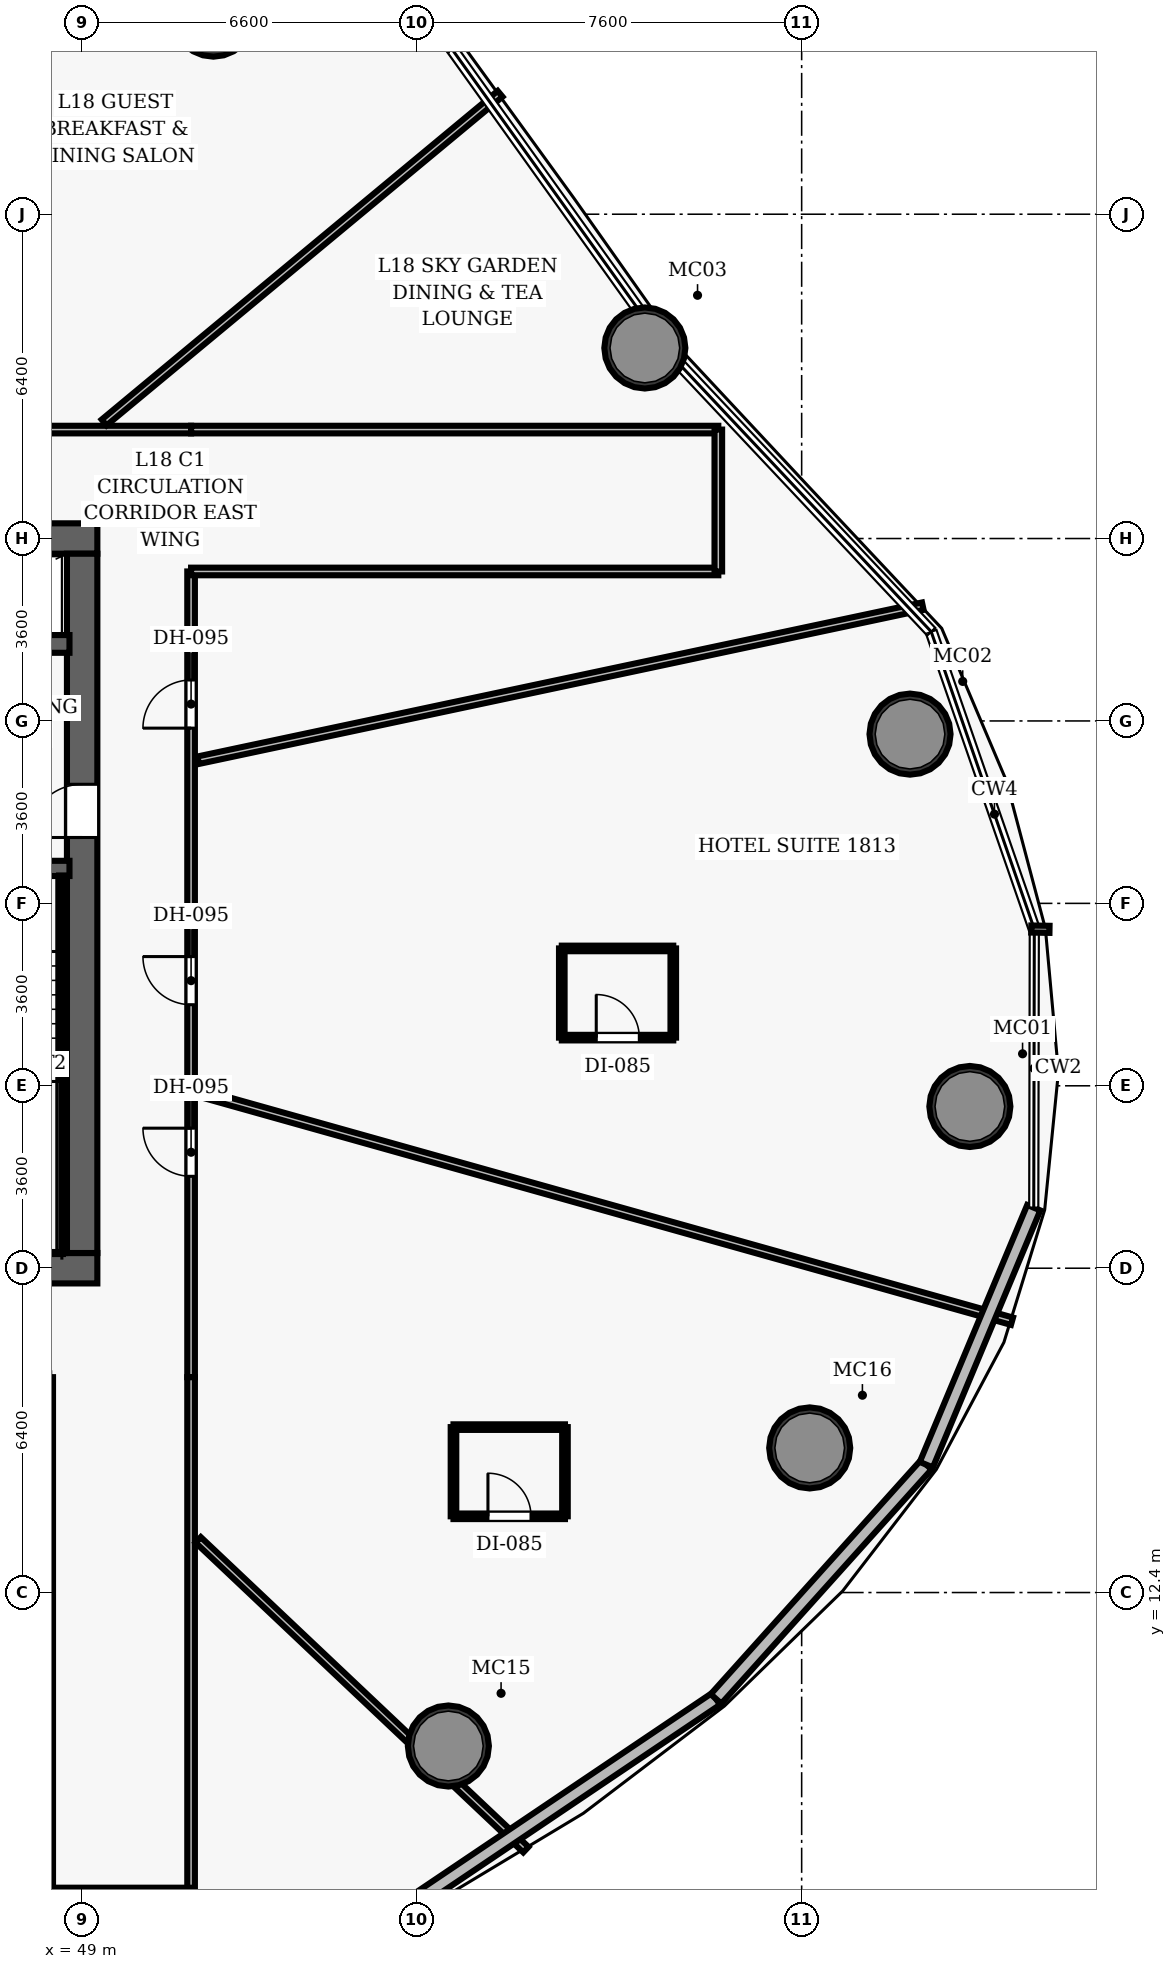
"""IFC4 building model, lengths in metres.
Left out: names, types, materials, properties, quantities, classifications, styles, units other than length and angle.
Written with IfcOpenShell. Run it as: python <this file> out.ifc"""

import sys

from ifc_helpers import new_model, si_unit, direction, frame, frame_2d, origin, origin_2d, place, context, subcontext, project, spatial, rectangle, hollow_circle, extrude, element, fill, save


model = new_model("IFC4")
c1 = context("Model", 3, precision=1e-05, world=origin(), true_north=direction((0.0, 1.0)))
c2 = subcontext(c1, "Body", "Model", "MODEL_VIEW")
j1 = project(units=[si_unit("LENGTHUNIT", "METRE"), si_unit("PLANEANGLEUNIT", "RADIAN")], contexts=[c1])
p1 = place(None, origin())
s1 = spatial("IfcSite", under=j1, at=p1, CompositionType="ELEMENT")
p2 = place(p1, origin())
s2 = spatial("IfcBuilding", under=s1, at=p2, CompositionType="ELEMENT")
p3 = place(p2, frame((0.0, 0.0, 79.9)))
s3 = spatial("IfcBuildingStorey", under=s2, at=p3, CompositionType="ELEMENT", Elevation=79.9)
p4 = place(p3, frame((26.7, 18.8, 0.0), z_axis=(0.0, 0.0, 1.0), x_axis=(1.0, 0.0, 0.0)))
e1 = element("IfcWall", 1, at=p4, inside=s3, PredefinedType="SHEAR", context=c2, shape_type="SweptSolid", body=[
    extrude(rectangle(XDim=22.6, YDim=0.6, at=frame_2d((11.3, 0.0))), origin(), (0.0, 0.0, 1.0), 3.5),
])
p5 = place(p4, frame((14.52, 0.0, 0.0)))
e2 = element("IfcOpeningElement", 2, at=p5, cuts=e1, PredefinedType="OPENING", context=c2, shape_type="SweptSolid", body=[
    extrude(rectangle(XDim=1.05, YDim=2.15, at=frame_2d((0.525, 1.075))), frame((0.0, 0.31, 0.0), z_axis=(0.0, -1.0, 0.0), x_axis=(1.0, 0.0, 0.0)), (0.0, 0.0, 1.0), 0.62),
])
p6 = place(p3, frame((26.7, 33.2, 0.0), z_axis=(0.0, 0.0, 1.0), x_axis=(1.0, 0.0, 0.0)))
e3 = element("IfcWall", 3, at=p6, inside=s3, PredefinedType="SHEAR", context=c2, shape_type="SweptSolid", body=[
    extrude(rectangle(XDim=22.6, YDim=0.6, at=frame_2d((11.3, 0.0))), origin(), (0.0, 0.0, 1.0), 3.5),
])
p7 = place(p6, frame((4.62, 0.0, 0.0)))
e4 = element("IfcOpeningElement", 4, at=p7, cuts=e3, PredefinedType="OPENING", context=c2, shape_type="SweptSolid", body=[
    extrude(rectangle(XDim=1.05, YDim=2.15, at=frame_2d((0.525, 1.075))), frame((0.0, 0.31, 0.0), z_axis=(0.0, -1.0, 0.0), x_axis=(1.0, 0.0, 0.0)), (0.0, 0.0, 1.0), 0.62),
])
p8 = place(p6, frame((14.52, 0.0, 0.0)))
e5 = element("IfcOpeningElement", 5, at=p8, cuts=e3, PredefinedType="OPENING", context=c2, shape_type="SweptSolid", body=[
    extrude(rectangle(XDim=1.05, YDim=2.15, at=frame_2d((0.525, 1.075))), frame((0.0, 0.31, 0.0), z_axis=(0.0, -1.0, 0.0), x_axis=(1.0, 0.0, 0.0)), (0.0, 0.0, 1.0), 0.62),
])
p9 = place(p3, frame((49.0, 19.1, 0.0), z_axis=(0.0, 0.0, 1.0), x_axis=(0.0, 1.0, 0.0)))
e6 = element("IfcWall", 6, at=p9, inside=s3, PredefinedType="SHEAR", context=c2, shape_type="SweptSolid", body=[
    extrude(rectangle(XDim=13.8, YDim=0.6, at=frame_2d((6.9, 0.0))), origin(), (0.0, 0.0, 1.0), 3.5),
])
p10 = place(p9, frame((8.2, 0.0, 0.0)))
e7 = element("IfcOpeningElement", 7, at=p10, cuts=e6, PredefinedType="OPENING", context=c2, shape_type="SweptSolid", body=[
    extrude(rectangle(XDim=1.05, YDim=2.15, at=frame_2d((0.525, 1.075))), frame((0.0, 0.31, 0.0), z_axis=(0.0, -1.0, 0.0), x_axis=(1.0, 0.0, 0.0)), (0.0, 0.0, 1.0), 0.62),
])
for number, where, z_axis, x_axis in (
    (8, (66.52, 21.992, 0.0), (0.0, 0.0, 1.0), (1.0, 0.0, 0.0)),
    (9, (65.339, 29.34, 0.0), (0.0, 0.0, 1.0), (1.0, 0.0, 0.0)),
    (10, (60.105, 36.96, 0.0), (0.0, 0.0, 1.0), (1.0, 0.0, 0.0)),
    (11, (51.59, 43.509, 0.0), (0.0, 0.0, 1.0), (1.0, 0.0, 0.0)),
    (12, (56.228, 9.371, 0.0), (0.0, 0.0, 1.0), (1.0, 0.0, 0.0)),
    (13, (63.359, 15.254, 0.0), (0.0, 0.0, 1.0), (1.0, 0.0, 0.0)),
):
    element("IfcColumn", number, at=place(p3, frame(where, z_axis=z_axis, x_axis=x_axis)), inside=s3, PredefinedType="COLUMN", context=c2, shape_type="SweptSolid", body=[
        extrude(hollow_circle(Radius=0.8, WallThickness=0.06, at=origin_2d()), origin(), (0.0, 0.0, 1.0), 3.5),
    ])
p11 = place(p3, frame((45.08, 26.69, 0.0), z_axis=(0.0, 0.0, 1.0), x_axis=(1.0, 0.0, 0.0)))
e14 = element("IfcWall", 14, at=p11, inside=s3, PredefinedType="SHEAR", context=c2, shape_type="SweptSolid", body=[
    extrude(rectangle(XDim=3.67, YDim=0.3, at=frame_2d((1.835, 0.0))), origin(), (0.0, 0.0, 1.0), 3.5),
])
p12 = place(p11, frame((1.05, 0.0, 0.0)))
e15 = element("IfcOpeningElement", 15, at=p12, cuts=e14, PredefinedType="OPENING", context=c2, shape_type="SweptSolid", body=[
    extrude(rectangle(XDim=1.1, YDim=2.15, at=frame_2d((0.55, 1.075))), frame((0.0, 0.16, 0.0), z_axis=(0.0, -1.0, 0.0), x_axis=(1.0, 0.0, 0.0)), (0.0, 0.0, 1.0), 0.32),
])
p13 = place(p3, frame((48.605, 19.1, 0.0), z_axis=(0.0, 0.0, 1.0), x_axis=(0.0, 1.0, 0.0)))
e16 = element("IfcWall", 16, at=p13, inside=s3, PredefinedType="SHEAR", context=c2, shape_type="SweptSolid", body=[
    extrude(rectangle(XDim=7.45, YDim=0.12, at=frame_2d((3.725, 0.0))), origin(), (0.0, 0.0, 1.0), 3.5),
])
p14 = place(p3, frame((45.51, 19.16, 0.0), z_axis=(0.0, 0.0, 1.0), x_axis=(1.0, 0.0, 0.0)))
e17 = element("IfcWall", 17, at=p14, inside=s3, PredefinedType="SHEAR", context=c2, shape_type="SweptSolid", body=[
    extrude(rectangle(XDim=3.095, YDim=0.12, at=frame_2d((1.547, 0.0))), origin(), (0.0, 0.0, 1.0), 3.5),
])
p15 = place(p3, frame((45.08, 31.12, 0.0), z_axis=(0.0, 0.0, 1.0), x_axis=(1.0, 0.0, 0.0)))
e18 = element("IfcWall", 18, at=p15, inside=s3, PredefinedType="SHEAR", context=c2, shape_type="SweptSolid", body=[
    extrude(rectangle(XDim=3.67, YDim=0.35, at=frame_2d((1.835, 0.0))), origin(), (0.0, 0.0, 1.0), 2.6),
])
p16 = place(p15, frame((1.25, 0.0, 0.0)))
e19 = element("IfcOpeningElement", 19, at=p16, cuts=e18, PredefinedType="OPENING", context=c2, shape_type="SweptSolid", body=[
    extrude(rectangle(XDim=1.1, YDim=2.15, at=frame_2d((0.55, 1.075))), frame((0.0, 0.185, 0.0), z_axis=(0.0, -1.0, 0.0), x_axis=(1.0, 0.0, 0.0)), (0.0, 0.0, 1.0), 0.37),
])
p17 = place(p3, frame((27.65, 35.35, 0.0), z_axis=(0.0, 0.0, 1.0), x_axis=(1.0, 0.0, 0.0)))
e20 = element("IfcWall", 20, at=p17, inside=s3, PredefinedType="PARTITIONING", context=c2, shape_type="SweptSolid", body=[
    extrude(rectangle(XDim=23.5, YDim=0.15, at=frame_2d((11.75, 0.0))), origin(), (0.0, 0.0, 1.0), 2.6),
])
p18 = place(p17, frame((15.553, 0.0, 0.0)))
e21 = element("IfcOpeningElement", 21, at=p18, cuts=e20, PredefinedType="OPENING", context=c2, shape_type="SweptSolid", body=[
    extrude(rectangle(XDim=0.95, YDim=2.15, at=frame_2d((0.475, 1.075))), frame((0.0, 0.085, 0.0), z_axis=(0.0, -1.0, 0.0), x_axis=(1.0, 0.0, 0.0)), (0.0, 0.0, 1.0), 0.17),
])
p19 = place(p17, frame((10.082, 0.0, 0.0)))
e22 = element("IfcOpeningElement", 22, at=p19, cuts=e20, PredefinedType="OPENING", context=c2, shape_type="SweptSolid", body=[
    extrude(rectangle(XDim=0.95, YDim=2.15, at=frame_2d((0.475, 1.075))), frame((0.0, 0.085, 0.0), z_axis=(0.0, -1.0, 0.0), x_axis=(1.0, 0.0, 0.0)), (0.0, 0.0, 1.0), 0.17),
])
p20 = place(p17, frame((7.866, 0.0, 0.0)))
e23 = element("IfcOpeningElement", 23, at=p20, cuts=e20, PredefinedType="OPENING", context=c2, shape_type="SweptSolid", body=[
    extrude(rectangle(XDim=0.95, YDim=2.15, at=frame_2d((0.475, 1.075))), frame((0.0, 0.085, 0.0), z_axis=(0.0, -1.0, 0.0), x_axis=(1.0, 0.0, 0.0)), (0.0, 0.0, 1.0), 0.17),
])
p21 = place(p3, frame((51.15, 16.65, 0.0), z_axis=(0.0, 0.0, 1.0), x_axis=(0.0, 1.0, 0.0)))
e24 = element("IfcWall", 24, at=p21, inside=s3, PredefinedType="PARTITIONING", context=c2, shape_type="SweptSolid", body=[
    extrude(rectangle(XDim=15.9, YDim=0.15, at=frame_2d((7.95, 0.0))), origin(), (0.0, 0.0, 1.0), 2.6),
])
p22 = place(p21, frame((12.808, 0.0, 0.0)))
e25 = element("IfcOpeningElement", 25, at=p22, cuts=e24, PredefinedType="OPENING", context=c2, shape_type="SweptSolid", body=[
    extrude(rectangle(XDim=0.95, YDim=2.15, at=frame_2d((0.475, 1.075))), frame((0.0, 0.085, 0.0), z_axis=(0.0, -1.0, 0.0), x_axis=(1.0, 0.0, 0.0)), (0.0, 0.0, 1.0), 0.17),
])
p23 = place(p21, frame((3.964, 0.0, 0.0)))
e26 = element("IfcOpeningElement", 26, at=p23, cuts=e24, PredefinedType="OPENING", context=c2, shape_type="SweptSolid", body=[
    extrude(rectangle(XDim=0.95, YDim=2.15, at=frame_2d((0.475, 1.075))), frame((0.0, 0.085, 0.0), z_axis=(0.0, -1.0, 0.0), x_axis=(1.0, 0.0, 0.0)), (0.0, 0.0, 1.0), 0.17),
])
p24 = place(p21, frame((7.35, 0.0, 0.0)))
e27 = element("IfcOpeningElement", 27, at=p24, cuts=e24, PredefinedType="OPENING", context=c2, shape_type="SweptSolid", body=[
    extrude(rectangle(XDim=0.95, YDim=2.15, at=frame_2d((0.475, 1.075))), frame((0.0, 0.085, 0.0), z_axis=(0.0, -1.0, 0.0), x_axis=(1.0, 0.0, 0.0)), (0.0, 0.0, 1.0), 0.17),
])
for number, where, z_axis, x_axis in (
    (28, (51.15, 35.35, 0.0), (0.0, 0.0, 1.0), (1.0, 0.0, 0.0)),
    (29, (51.15, 32.55, 0.0), (0.0, 0.0, 1.0), (1.0, 0.0, 0.0)),
):
    element("IfcWall", number, at=place(p3, frame(where, z_axis=z_axis, x_axis=x_axis)), inside=s3, PredefinedType="PARTITIONING", context=c2, shape_type="SweptSolid", body=[
        extrude(rectangle(XDim=10.405, YDim=0.15, at=frame_2d((5.203, 0.0))), origin(), (0.0, 0.0, 1.0), 2.6),
    ])
p25 = place(p3, frame((61.555, 32.55, 0.0), z_axis=(0.0, 0.0, 1.0), x_axis=(0.0, 1.0, 0.0)))
e30 = element("IfcWall", 30, at=p25, inside=s3, PredefinedType="PARTITIONING", context=c2, shape_type="SweptSolid", body=[
    extrude(rectangle(XDim=2.8, YDim=0.15, at=frame_2d((1.4, 0.0))), origin(), (0.0, 0.0, 1.0), 2.6),
])
for number, where, z_axis, x_axis in (
    (31, (48.35, 6.5, 0.0), (0.0, 0.0, 1.0), (0.0, 1.0, 0.0)),
    (32, (51.15, 6.5, 0.0), (0.0, 0.0, 1.0), (0.0, 1.0, 0.0)),
):
    element("IfcWall", number, at=place(p3, frame(where, z_axis=z_axis, x_axis=x_axis)), inside=s3, PredefinedType="PARTITIONING", context=c2, shape_type="SweptSolid", body=[
        extrude(rectangle(XDim=10.15, YDim=0.15, at=frame_2d((5.075, 0.0))), origin(), (0.0, 0.0, 1.0), 2.6),
    ])
p26 = place(p3, frame((48.35, 6.5, 0.0), z_axis=(0.0, 0.0, 1.0), x_axis=(1.0, 0.0, 0.0)))
e33 = element("IfcWall", 33, at=p26, inside=s3, PredefinedType="PARTITIONING", context=c2, shape_type="SweptSolid", body=[
    extrude(rectangle(XDim=2.8, YDim=0.15, at=frame_2d((1.4, 0.0))), origin(), (0.0, 0.0, 1.0), 2.6),
])
p27 = place(p3, frame((51.29, 28.825, 0.0), z_axis=(0.0, 0.0, 1.0), x_axis=(0.978150744302, 0.207896900943, 0.0)))
e34 = element("IfcWall", 34, at=p27, inside=s3, PredefinedType="PARTITIONING", context=c2, shape_type="SweptSolid", body=[
    extrude(rectangle(XDim=14.62, YDim=0.15, at=frame_2d((7.31, 0.0))), origin(), (0.0, 0.0, 1.0), 2.6),
])
p28 = place(p3, frame((49.434, 35.49, 0.0), z_axis=(0.0, 0.0, 1.0), x_axis=(0.769488794151, 0.638660313216, 0.0)))
e35 = element("IfcWall", 35, at=p28, inside=s3, PredefinedType="PARTITIONING", context=c2, shape_type="SweptSolid", body=[
    extrude(rectangle(XDim=10.155, YDim=0.15, at=frame_2d((5.078, 0.0))), origin(), (0.0, 0.0, 1.0), 2.6),
])
p29 = place(p3, frame((51.29, 13.439, 0.0), z_axis=(0.0, 0.0, 1.0), x_axis=(0.72675745836, -0.686894167043, 0.0)))
e36 = element("IfcWall", 36, at=p29, inside=s3, PredefinedType="PARTITIONING", context=c2, shape_type="SweptSolid", body=[
    extrude(rectangle(XDim=8.899, YDim=0.15, at=frame_2d((4.449, 0.0))), origin(), (0.0, 0.0, 1.0), 2.6),
])
p30 = place(p3, frame((51.29, 22.266, 0.0), z_axis=(0.0, 0.0, 1.0), x_axis=(0.962725636105, -0.270479850611, 0.0)))
e37 = element("IfcWall", 37, at=p30, inside=s3, PredefinedType="PARTITIONING", context=c2, shape_type="SweptSolid", body=[
    extrude(rectangle(XDim=16.683, YDim=0.15, at=frame_2d((8.342, 0.0))), origin(), (0.0, 0.0, 1.0), 2.6),
])
p31 = place(p3, frame((56.329, 13.904, 0.0), z_axis=(0.0, 0.0, 1.0), x_axis=(1.0, 0.0, 0.0)))
e38 = element("IfcWall", 38, at=p31, inside=s3, PredefinedType="PARTITIONING", context=c2, shape_type="SweptSolid", body=[
    extrude(rectangle(XDim=2.2, YDim=0.11, at=frame_2d((1.1, 0.0))), origin(), (0.0, 0.0, 1.0), 2.6),
])
p32 = place(p31, frame((0.68, 0.0, 0.0)))
e39 = element("IfcOpeningElement", 39, at=p32, cuts=e38, PredefinedType="OPENING", context=c2, shape_type="SweptSolid", body=[
    extrude(rectangle(XDim=0.85, YDim=2.1, at=frame_2d((0.425, 1.05))), frame((0.0, 0.065, 0.0), z_axis=(0.0, -1.0, 0.0), x_axis=(1.0, 0.0, 0.0)), (0.0, 0.0, 1.0), 0.13),
])
p33 = place(p3, frame((56.329, 15.664, 0.0), z_axis=(0.0, 0.0, 1.0), x_axis=(1.0, 0.0, 0.0)))
e40 = element("IfcWall", 40, at=p33, inside=s3, PredefinedType="PARTITIONING", context=c2, shape_type="SweptSolid", body=[
    extrude(rectangle(XDim=2.2, YDim=0.11, at=frame_2d((1.1, 0.0))), origin(), (0.0, 0.0, 1.0), 2.6),
])
for number, where, z_axis, x_axis in (
    (41, (56.329, 13.904, 0.0), (0.0, 0.0, 1.0), (0.0, 1.0, 0.0)),
    (42, (58.529, 13.904, 0.0), (0.0, 0.0, 1.0), (0.0, 1.0, 0.0)),
):
    element("IfcWall", number, at=place(p3, frame(where, z_axis=z_axis, x_axis=x_axis)), inside=s3, PredefinedType="PARTITIONING", context=c2, shape_type="SweptSolid", body=[
        extrude(rectangle(XDim=1.76, YDim=0.11, at=frame_2d((0.88, 0.0))), origin(), (0.0, 0.0, 1.0), 2.6),
    ])
p34 = place(p3, frame((58.466, 23.351, 0.0), z_axis=(0.0, 0.0, 1.0), x_axis=(1.0, 0.0, 0.0)))
e43 = element("IfcWall", 43, at=p34, inside=s3, PredefinedType="PARTITIONING", context=c2, shape_type="SweptSolid", body=[
    extrude(rectangle(XDim=2.2, YDim=0.11, at=frame_2d((1.1, 0.0))), origin(), (0.0, 0.0, 1.0), 2.6),
])
p35 = place(p34, frame((0.68, 0.0, 0.0)))
e44 = element("IfcOpeningElement", 44, at=p35, cuts=e43, PredefinedType="OPENING", context=c2, shape_type="SweptSolid", body=[
    extrude(rectangle(XDim=0.85, YDim=2.1, at=frame_2d((0.425, 1.05))), frame((0.0, 0.065, 0.0), z_axis=(0.0, -1.0, 0.0), x_axis=(1.0, 0.0, 0.0)), (0.0, 0.0, 1.0), 0.13),
])
p36 = place(p3, frame((58.466, 25.111, 0.0), z_axis=(0.0, 0.0, 1.0), x_axis=(1.0, 0.0, 0.0)))
e45 = element("IfcWall", 45, at=p36, inside=s3, PredefinedType="PARTITIONING", context=c2, shape_type="SweptSolid", body=[
    extrude(rectangle(XDim=2.2, YDim=0.11, at=frame_2d((1.1, 0.0))), origin(), (0.0, 0.0, 1.0), 2.6),
])
for number, where, z_axis, x_axis in (
    (46, (58.466, 23.351, 0.0), (0.0, 0.0, 1.0), (0.0, 1.0, 0.0)),
    (47, (60.666, 23.351, 0.0), (0.0, 0.0, 1.0), (0.0, 1.0, 0.0)),
):
    element("IfcWall", number, at=place(p3, frame(where, z_axis=z_axis, x_axis=x_axis)), inside=s3, PredefinedType="PARTITIONING", context=c2, shape_type="SweptSolid", body=[
        extrude(rectangle(XDim=1.76, YDim=0.11, at=frame_2d((0.88, 0.0))), origin(), (0.0, 0.0, 1.0), 2.6),
    ])
p37 = place(p3, frame((61.51, 10.301, 0.0), z_axis=(0.0, 0.0, 1.0), x_axis=(-0.829395880277, -0.558661322967, 0.0)))
e48 = element("IfcWall", 48, at=p37, inside=s3, PredefinedType="SOLIDWALL", context=c2, shape_type="SweptSolid", body=[
    extrude(rectangle(XDim=7.143, YDim=0.28, at=frame_2d((3.571, 0.0))), origin(), (0.0, 0.0, 1.0), 3.25),
])
p38 = place(p3, frame((65.66, 14.923, 0.0), z_axis=(0.0, 0.0, 1.0), x_axis=(-0.668100062794, -0.744071438838, 0.0)))
e49 = element("IfcWall", 49, at=p38, inside=s3, PredefinedType="SOLIDWALL", context=c2, shape_type="SweptSolid", body=[
    extrude(rectangle(XDim=6.212, YDim=0.28, at=frame_2d((3.106, 0.0))), origin(), (0.0, 0.0, 1.0), 3.25),
])
p39 = place(p3, frame((67.781, 19.995, 0.0), z_axis=(0.0, 0.0, 1.0), x_axis=(-0.385703037269, -0.922622982069, 0.0)))
e50 = element("IfcWall", 50, at=p39, inside=s3, PredefinedType="SOLIDWALL", context=c2, shape_type="SweptSolid", body=[
    extrude(rectangle(XDim=5.497, YDim=0.28, at=frame_2d((2.749, 0.0))), origin(), (0.0, 0.0, 1.0), 3.25),
])
p40 = place(p10, origin())
e51 = element("IfcDoor", 51, at=p40, inside=s3, OperationType="SINGLE_SWING_LEFT", PredefinedType="DOOR", context=c2, shape_type="SweptSolid", body=[
    extrude(rectangle(XDim=1.05, YDim=2.15, at=frame_2d((0.525, 1.075))), frame((0.0, 0.025, 0.0), z_axis=(0.0, -1.0, 0.0), x_axis=(1.0, 0.0, 0.0)), (0.0, 0.0, 1.0), 0.05),
])
fill(e7, e51)
p41 = place(p22, origin())
e52 = element("IfcDoor", 52, at=p41, inside=s3, OperationType="SINGLE_SWING_LEFT", PredefinedType="DOOR", context=c2, shape_type="SweptSolid", body=[
    extrude(rectangle(XDim=0.95, YDim=2.15, at=frame_2d((0.475, 1.075))), frame((0.0, 0.025, 0.0), z_axis=(0.0, -1.0, 0.0), x_axis=(1.0, 0.0, 0.0)), (0.0, 0.0, 1.0), 0.05),
])
fill(e25, e52)
p42 = place(p23, origin())
e53 = element("IfcDoor", 53, at=p42, inside=s3, OperationType="SINGLE_SWING_RIGHT", PredefinedType="DOOR", context=c2, shape_type="SweptSolid", body=[
    extrude(rectangle(XDim=0.95, YDim=2.15, at=frame_2d((0.475, 1.075))), frame((0.0, 0.025, 0.0), z_axis=(0.0, -1.0, 0.0), x_axis=(1.0, 0.0, 0.0)), (0.0, 0.0, 1.0), 0.05),
])
fill(e26, e53)
p43 = place(p32, origin())
e54 = element("IfcDoor", 54, at=p43, inside=s3, OperationType="SINGLE_SWING_LEFT", PredefinedType="DOOR", context=c2, shape_type="SweptSolid", body=[
    extrude(rectangle(XDim=0.85, YDim=2.1, at=frame_2d((0.425, 1.05))), frame((0.0, 0.025, 0.0), z_axis=(0.0, -1.0, 0.0), x_axis=(1.0, 0.0, 0.0)), (0.0, 0.0, 1.0), 0.05),
])
fill(e39, e54)
p44 = place(p24, origin())
e55 = element("IfcDoor", 55, at=p44, inside=s3, OperationType="SINGLE_SWING_RIGHT", PredefinedType="DOOR", context=c2, shape_type="SweptSolid", body=[
    extrude(rectangle(XDim=0.95, YDim=2.15, at=frame_2d((0.475, 1.075))), frame((0.0, 0.025, 0.0), z_axis=(0.0, -1.0, 0.0), x_axis=(1.0, 0.0, 0.0)), (0.0, 0.0, 1.0), 0.05),
])
fill(e27, e55)
p45 = place(p35, origin())
e56 = element("IfcDoor", 56, at=p45, inside=s3, OperationType="SINGLE_SWING_LEFT", PredefinedType="DOOR", context=c2, shape_type="SweptSolid", body=[
    extrude(rectangle(XDim=0.85, YDim=2.1, at=frame_2d((0.425, 1.05))), frame((0.0, 0.025, 0.0), z_axis=(0.0, -1.0, 0.0), x_axis=(1.0, 0.0, 0.0)), (0.0, 0.0, 1.0), 0.05),
])
fill(e44, e56)
save(model, sys.argv[1])
